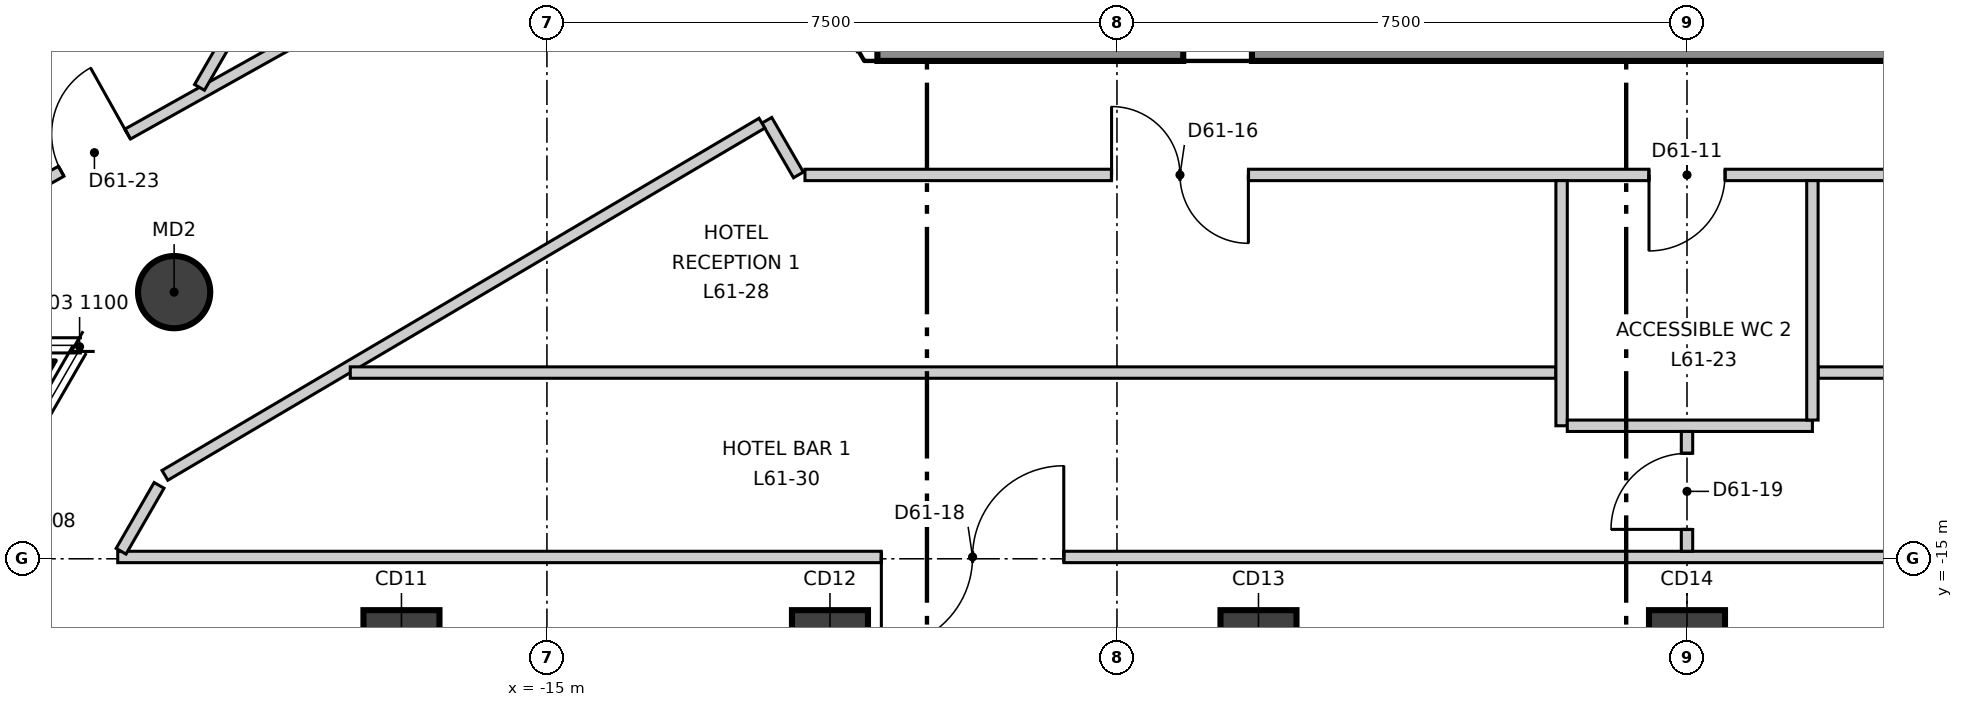
"""IFC4 building model, lengths in metres.
Left out: names, types, materials, properties, quantities, classifications, styles, units other than length and angle.
Written with IfcOpenShell. Run it as: python <this file> out.ifc"""

import sys

from ifc_helpers import new_model, si_unit, direction, frame, frame_2d, origin, origin_2d, place, context, subcontext, project, spatial, polyline, rectangle, circle, outline, extrude, element, fill, save


model = new_model("IFC4")
c1 = context("Model", 3, precision=1e-05, world=origin(), true_north=direction((0.0, 1.0)))
c2 = subcontext(c1, "Body", "Model", "MODEL_VIEW")
j1 = project(units=[si_unit("LENGTHUNIT", "METRE"), si_unit("PLANEANGLEUNIT", "RADIAN")], contexts=[c1])
p1 = place(None, origin())
s1 = spatial("IfcSite", under=j1, at=p1, CompositionType="ELEMENT")
p2 = place(p1, origin())
s2 = spatial("IfcBuilding", under=s1, at=p2, CompositionType="ELEMENT")
p3 = place(p2, frame((0.0, 0.0, 261.8)))
s3 = spatial("IfcBuildingStorey", under=s2, at=p3, CompositionType="ELEMENT", Elevation=261.8)
p4 = place(p3, frame((-12.384, -5.15, -0.3), z_axis=(0.0, 0.0, 1.0), x_axis=(0.49997462182, -0.866040055388, 0.0)))
e1 = element("IfcWall", 1, at=p4, inside=s3, PredefinedType="SHEAR", context=c2, shape_type="SweptSolid", body=[
    extrude(outline(polyline([(-0.173, -0.301), (1.732, -0.301), (3.637, -0.3), (3.291, 0.3), (1.732, 0.3), (0.173, 0.3), (-0.173, -0.301)])), origin(), (0.0, 0.0, 1.0), 6.5),
])
p5 = place(p4, frame((1.032, 0.0, 0.3)))
e2 = element("IfcOpeningElement", 2, at=p5, cuts=e1, PredefinedType="OPENING", context=c2, shape_type="SweptSolid", body=[
    extrude(rectangle(XDim=1.4, YDim=2.1, at=frame_2d((0.7, 1.05))), frame((0.0, 0.31, 0.0), z_axis=(0.0, -1.0, 0.0), x_axis=(1.0, 0.0, 0.0)), (0.0, 0.0, 1.0), 0.621),
])
p6 = place(p3, frame((-10.652, -8.15, -0.3), z_axis=(0.0, 0.0, 1.0), x_axis=(1.0, 0.0, 0.0)))
e3 = element("IfcWall", 3, at=p6, inside=s3, PredefinedType="SHEAR", context=c2, shape_type="SweptSolid", body=[
    extrude(outline(polyline([(-0.173, -0.3), (1.795, -0.3), (3.763, -0.3), (5.731, -0.3), (7.7, -0.3), (9.668, -0.3), (11.636, -0.3), (13.604, -0.3), (15.573, -0.3), (17.541, -0.3), (19.509, -0.3), (21.477, -0.3), (21.131, 0.3), (19.226, 0.3), (17.321, 0.3), (15.415, 0.3), (13.51, 0.3), (11.605, 0.3), (9.699, 0.3), (7.794, 0.3), (5.889, 0.3), (3.984, 0.3), (2.078, 0.3), (0.173, 0.3), (-0.173, -0.3)])), origin(), (0.0, 0.0, 1.0), 6.5),
])
p7 = place(p6, frame((4.026, 0.0, 0.3)))
e4 = element("IfcOpeningElement", 4, at=p7, cuts=e3, PredefinedType="OPENING", context=c2, shape_type="SweptSolid", body=[
    extrude(rectangle(XDim=0.9, YDim=2.1, at=frame_2d((0.45, 1.05))), frame((0.0, 0.31, 0.0), z_axis=(0.0, -1.0, 0.0), x_axis=(1.0, 0.0, 0.0)), (0.0, 0.0, 1.0), 0.62),
])
p8 = place(p6, frame((16.378, 0.0, 0.3)))
e5 = element("IfcOpeningElement", 5, at=p8, cuts=e3, PredefinedType="OPENING", context=c2, shape_type="SweptSolid", body=[
    extrude(rectangle(XDim=0.9, YDim=2.1, at=frame_2d((0.45, 1.05))), frame((0.0, 0.31, 0.0), z_axis=(0.0, -1.0, 0.0), x_axis=(1.0, 0.0, 0.0)), (0.0, 0.0, 1.0), 0.62),
])
for number, where, z_axis, x_axis in (
    (6, (-16.914, -16.076, -0.3), (0.0, 0.0, 1.0), (1.0, 0.0, 0.0)),
    (7, (-11.276, -16.076, -0.3), (0.0, 0.0, 1.0), (1.0, 0.0, 0.0)),
    (8, (-5.638, -16.076, -0.3), (0.0, 0.0, 1.0), (1.0, 0.0, 0.0)),
    (9, (0.0, -16.076, -0.3), (0.0, 0.0, 1.0), (1.0, 0.0, 0.0)),
):
    element("IfcColumn", number, at=place(p3, frame(where, z_axis=z_axis, x_axis=x_axis)), inside=s3, PredefinedType="COLUMN", context=c2, shape_type="SweptSolid", body=[
        extrude(rectangle(XDim=1.0, YDim=0.8, at=origin_2d()), origin(), (0.0, 0.0, 1.0), 6.5),
    ])
p9 = place(p3, frame((-19.905, -11.492, -0.3), z_axis=(0.0, 0.0, 1.0), x_axis=(1.0, 0.0, 0.0)))
e10 = element("IfcColumn", 10, at=p9, inside=s3, PredefinedType="COLUMN", context=c2, shape_type="SweptSolid", body=[
    extrude(circle(Radius=0.475, at=origin_2d()), origin(), (0.0, 0.0, 1.0), 6.5),
])
p10 = place(p3, frame((2.166, 21.349, 0.0), z_axis=(0.0, 0.0, 1.0), x_axis=(0.499984980739, -0.866034074985, 0.0)))
e11 = element("IfcWall", 11, at=p10, inside=s3, PredefinedType="PARTITIONING", context=c2, shape_type="SweptSolid", body=[
    extrude(rectangle(XDim=34.991, YDim=0.15, at=frame_2d((17.495, 0.0))), origin(), (0.0, 0.0, 1.0), 6.2),
])
p11 = place(p3, frame((-12.107, -9.231, 0.0), z_axis=(0.0, 0.0, 1.0), x_axis=(0.500816129582, -0.865553698133, 0.0)))
e12 = element("IfcWall", 12, at=p11, inside=s3, PredefinedType="PARTITIONING", context=c2, shape_type="SweptSolid", body=[
    extrude(rectangle(XDim=0.831, YDim=0.15, at=frame_2d((0.415, 0.0))), origin(), (0.0, 0.0, 1.0), 6.2),
])
p12 = place(p3, frame((-22.268, -10.392, 0.0), z_axis=(0.0, 0.0, 1.0), x_axis=(0.872777845943, 0.488117641179, 0.0)))
e13 = element("IfcWall", 13, at=p12, inside=s3, PredefinedType="PARTITIONING", context=c2, shape_type="SweptSolid", body=[
    extrude(rectangle(XDim=9.307, YDim=0.15, at=frame_2d((4.654, 0.0))), origin(), (0.0, 0.0, 1.0), 5.65),
])
p13 = place(p12, frame((1.006, 0.0, 0.0)))
e14 = element("IfcOpeningElement", 14, at=p13, cuts=e13, PredefinedType="OPENING", context=c2, shape_type="SweptSolid", body=[
    extrude(rectangle(XDim=1.0, YDim=2.1, at=frame_2d((0.5, 1.05))), frame((0.0, 0.085, 0.0), z_axis=(0.0, -1.0, 0.0), x_axis=(1.0, 0.0, 0.0)), (0.0, 0.0, 1.0), 0.17),
])
p14 = place(p3, frame((-19.571, -8.798, 0.0), z_axis=(0.0, 0.0, 1.0), x_axis=(0.500014166641, 0.866017224516, 0.0)))
e15 = element("IfcWall", 15, at=p14, inside=s3, PredefinedType="PARTITIONING", context=c2, shape_type="SweptSolid", body=[
    extrude(rectangle(XDim=34.991, YDim=0.15, at=frame_2d((17.496, 0.0))), origin(), (0.0, 0.0, 1.0), 6.2),
])
p15 = place(p3, frame((-23.25, -10.317, 0.0), z_axis=(0.0, 0.0, 1.0), x_axis=(0.500024875003, 0.866011041719, 0.0)))
e16 = element("IfcWall", 16, at=p15, inside=s3, PredefinedType="PARTITIONING", context=c2, shape_type="SweptSolid", body=[
    extrude(rectangle(XDim=41.206, YDim=0.15, at=frame_2d((20.603, 0.0))), origin(), (0.0, 0.0, 1.0), 6.2),
])
p16 = place(p3, frame((-20.026, -13.902, 0.0), z_axis=(0.0, 0.0, 1.0), x_axis=(0.861335565544, 0.508036458859, 0.0)))
e17 = element("IfcWall", 17, at=p16, inside=s3, PredefinedType="PARTITIONING", context=c2, shape_type="SweptSolid", body=[
    extrude(rectangle(XDim=9.12, YDim=0.15, at=frame_2d((4.56, 0.0))), origin(), (0.0, 0.0, 1.0), 5.65),
])
p17 = place(p3, frame((-11.605, -9.95, 0.0), z_axis=(0.0, 0.0, 1.0), x_axis=(1.0, 0.0, 0.0)))
e18 = element("IfcWall", 18, at=p17, inside=s3, PredefinedType="PARTITIONING", context=c2, shape_type="SweptSolid", body=[
    extrude(rectangle(XDim=23.296, YDim=0.15, at=frame_2d((11.648, 0.0))), origin(), (0.0, 0.0, 1.0), 6.2),
])
p18 = place(p17, frame((11.105, 0.0, 0.0)))
e19 = element("IfcOpeningElement", 19, at=p18, cuts=e18, PredefinedType="OPENING", context=c2, shape_type="SweptSolid", body=[
    extrude(rectangle(XDim=1.0, YDim=2.1, at=frame_2d((0.5, 1.05))), frame((0.0, 0.085, 0.0), z_axis=(0.0, -1.0, 0.0), x_axis=(1.0, 0.0, 0.0)), (0.0, 0.0, 1.0), 0.17),
])
p19 = place(p17, frame((4.034, 0.0, 0.0)))
e20 = element("IfcOpeningElement", 20, at=p19, cuts=e18, PredefinedType="OPENING", context=c2, shape_type="SweptSolid", body=[
    extrude(rectangle(XDim=1.8, YDim=2.1, at=frame_2d((0.9, 1.05))), frame((0.0, 0.085, 0.0), z_axis=(0.0, -1.0, 0.0), x_axis=(1.0, 0.0, 0.0)), (0.0, 0.0, 1.0), 0.17),
])
p20 = place(p17, frame((17.776, 0.0, 0.0)))
e21 = element("IfcOpeningElement", 21, at=p20, cuts=e18, PredefinedType="OPENING", context=c2, shape_type="SweptSolid", body=[
    extrude(rectangle(XDim=1.0, YDim=2.1, at=frame_2d((0.5, 1.05))), frame((0.0, 0.085, 0.0), z_axis=(0.0, -1.0, 0.0), x_axis=(1.0, 0.0, 0.0)), (0.0, 0.0, 1.0), 0.17),
])
p21 = place(p3, frame((-20.647, -14.976, 0.0), z_axis=(0.0, 0.0, 1.0), x_axis=(1.0, 0.0, 0.0)))
e22 = element("IfcWall", 22, at=p21, inside=s3, PredefinedType="PARTITIONING", context=c2, shape_type="SweptSolid", body=[
    extrude(rectangle(XDim=41.294, YDim=0.15, at=frame_2d((20.647, 0.0))), origin(), (0.0, 0.0, 1.0), 6.2),
])
p22 = place(p21, frame((10.047, 0.0, 0.0)))
e23 = element("IfcOpeningElement", 23, at=p22, cuts=e22, PredefinedType="OPENING", context=c2, shape_type="SweptSolid", body=[
    extrude(rectangle(XDim=2.4, YDim=2.1, at=frame_2d((1.2, 1.05))), frame((0.0, 0.085, 0.0), z_axis=(0.0, -1.0, 0.0), x_axis=(1.0, 0.0, 0.0)), (0.0, 0.0, 1.0), 0.17),
])
p23 = place(p3, frame((-20.603, -14.901, 0.0), z_axis=(0.0, 0.0, 1.0), x_axis=(0.49960277677, 0.866254619292, 0.0)))
e24 = element("IfcWall", 24, at=p23, inside=s3, PredefinedType="PARTITIONING", context=c2, shape_type="SweptSolid", body=[
    extrude(rectangle(XDim=1.001, YDim=0.15, at=frame_2d((0.5, 0.0))), origin(), (0.0, 0.0, 1.0), 6.2),
])
p24 = place(p3, frame((-17.587, -12.55, 0.0), z_axis=(0.0, 0.0, 1.0), x_axis=(1.0, 0.0, 0.0)))
e25 = element("IfcWall", 25, at=p24, inside=s3, PredefinedType="PARTITIONING", context=c2, shape_type="SweptSolid", body=[
    extrude(rectangle(XDim=15.862, YDim=0.15, at=frame_2d((7.931, 0.0))), origin(), (0.0, 0.0, 1.0), 6.2),
])
p25 = place(p3, frame((1.725, -12.55, 0.0), z_axis=(0.0, 0.0, 1.0), x_axis=(1.0, 0.0, 0.0)))
e26 = element("IfcWall", 26, at=p25, inside=s3, PredefinedType="PARTITIONING", context=c2, shape_type="SweptSolid", body=[
    extrude(rectangle(XDim=15.681, YDim=0.15, at=frame_2d((7.84, 0.0))), origin(), (0.0, 0.0, 1.0), 6.2),
])
p26 = place(p3, frame((-1.65, -13.25, 0.0), z_axis=(0.0, 0.0, 1.0), x_axis=(0.0, 1.0, 0.0)))
e27 = element("IfcWall", 27, at=p26, inside=s3, PredefinedType="PARTITIONING", context=c2, shape_type="SweptSolid", body=[
    extrude(rectangle(XDim=3.225, YDim=0.15, at=frame_2d((1.613, 0.0))), origin(), (0.0, 0.0, 1.0), 6.2),
])
p27 = place(p3, frame((-1.575, -13.25, 0.0), z_axis=(0.0, 0.0, 1.0), x_axis=(1.0, 0.0, 0.0)))
e28 = element("IfcWall", 28, at=p27, inside=s3, PredefinedType="PARTITIONING", context=c2, shape_type="SweptSolid", body=[
    extrude(rectangle(XDim=3.225, YDim=0.15, at=frame_2d((1.612, 0.0))), origin(), (0.0, 0.0, 1.0), 6.2),
])
p28 = place(p3, frame((0.0, -14.901, 0.0), z_axis=(0.0, 0.0, 1.0), x_axis=(0.0, 1.0, 0.0)))
e29 = element("IfcWall", 29, at=p28, inside=s3, PredefinedType="PARTITIONING", context=c2, shape_type="SweptSolid", body=[
    extrude(rectangle(XDim=1.576, YDim=0.15, at=frame_2d((0.788, 0.0))), origin(), (0.0, 0.0, 1.0), 5.7),
])
p29 = place(p28, frame((0.288, 0.0, 0.0)))
e30 = element("IfcOpeningElement", 30, at=p29, cuts=e29, PredefinedType="OPENING", context=c2, shape_type="SweptSolid", body=[
    extrude(rectangle(XDim=1.0, YDim=2.1, at=frame_2d((0.5, 1.05))), frame((0.0, 0.085, 0.0), z_axis=(0.0, -1.0, 0.0), x_axis=(1.0, 0.0, 0.0)), (0.0, 0.0, 1.0), 0.17),
])
p30 = place(p3, frame((1.65, -13.175, 0.0), z_axis=(0.0, 0.0, 1.0), x_axis=(0.0, 1.0, 0.0)))
e31 = element("IfcWall", 31, at=p30, inside=s3, PredefinedType="PARTITIONING", context=c2, shape_type="SweptSolid", body=[
    extrude(rectangle(XDim=3.15, YDim=0.15, at=frame_2d((1.575, 0.0))), origin(), (0.0, 0.0, 1.0), 6.2),
])
p31 = place(p18, origin())
e32 = element("IfcDoor", 32, at=p31, inside=s3, OperationType="SINGLE_SWING_LEFT", PredefinedType="DOOR", context=c2, shape_type="SweptSolid", body=[
    extrude(rectangle(XDim=1.0, YDim=2.1, at=frame_2d((0.5, 1.05))), frame((0.0, 0.025, 0.0), z_axis=(0.0, -1.0, 0.0), x_axis=(1.0, 0.0, 0.0)), (0.0, 0.0, 1.0), 0.05),
])
fill(e19, e32)
p32 = place(p19, origin())
e33 = element("IfcDoor", 33, at=p32, inside=s3, OperationType="DOUBLE_DOOR_SINGLE_SWING", PredefinedType="DOOR", context=c2, shape_type="SweptSolid", body=[
    extrude(rectangle(XDim=1.8, YDim=2.1, at=frame_2d((0.9, 1.05))), frame((0.0, 0.025, 0.0), z_axis=(0.0, -1.0, 0.0), x_axis=(1.0, 0.0, 0.0)), (0.0, 0.0, 1.0), 0.05),
])
fill(e20, e33)
p33 = place(p22, origin())
e34 = element("IfcDoor", 34, at=p33, inside=s3, OperationType="DOUBLE_DOOR_SINGLE_SWING", PredefinedType="DOOR", context=c2, shape_type="SweptSolid", body=[
    extrude(rectangle(XDim=2.4, YDim=2.1, at=frame_2d((1.2, 1.05))), frame((0.0, 0.025, 0.0), z_axis=(0.0, -1.0, 0.0), x_axis=(1.0, 0.0, 0.0)), (0.0, 0.0, 1.0), 0.05),
])
fill(e23, e34)
p34 = place(p29, origin())
e35 = element("IfcDoor", 35, at=p34, inside=s3, OperationType="SINGLE_SWING_RIGHT", PredefinedType="DOOR", context=c2, shape_type="SweptSolid", body=[
    extrude(rectangle(XDim=1.0, YDim=2.1, at=frame_2d((0.5, 1.05))), frame((0.0, 0.025, 0.0), z_axis=(0.0, -1.0, 0.0), x_axis=(1.0, 0.0, 0.0)), (0.0, 0.0, 1.0), 0.05),
])
fill(e30, e35)
p35 = place(p13, origin())
e36 = element("IfcDoor", 36, at=p35, inside=s3, OperationType="SINGLE_SWING_LEFT", PredefinedType="DOOR", context=c2, shape_type="SweptSolid", body=[
    extrude(rectangle(XDim=1.0, YDim=2.1, at=frame_2d((0.5, 1.05))), frame((0.0, 0.025, 0.0), z_axis=(0.0, -1.0, 0.0), x_axis=(1.0, 0.0, 0.0)), (0.0, 0.0, 1.0), 0.05),
])
fill(e14, e36)
save(model, sys.argv[1])
